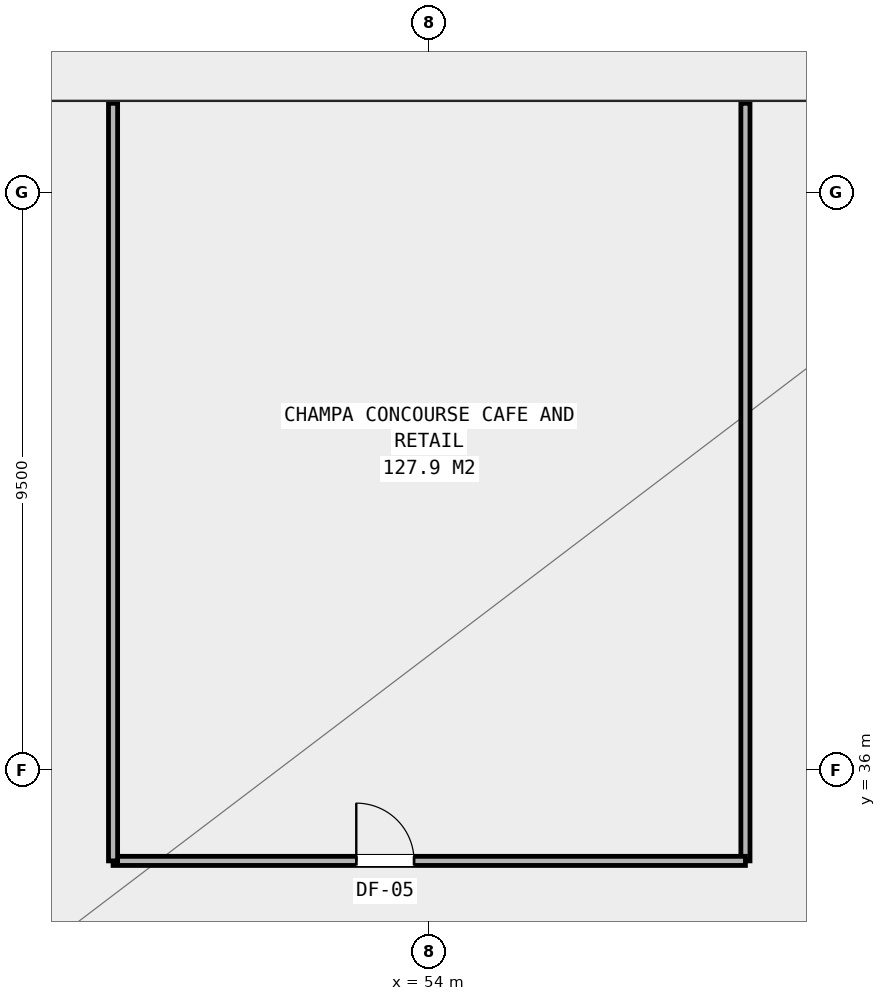
"""IFC4 building model, lengths in metres.
Left out: names, types, materials, properties, quantities, classifications, styles, units other than length and angle.
Written with IfcOpenShell. Run it as: python <this file> out.ifc"""

import sys

from ifc_helpers import new_model, si_unit, direction, frame, frame_2d, origin, place, context, subcontext, project, spatial, rectangle, extrude, element, fill, save


model = new_model("IFC4")
c1 = context("Model", 3, precision=1e-05, world=origin(), true_north=direction((0.0, 1.0)))
c2 = subcontext(c1, "Body", "Model", "MODEL_VIEW")
j1 = project(units=[si_unit("LENGTHUNIT", "METRE"), si_unit("PLANEANGLEUNIT", "RADIAN")], contexts=[c1])
p1 = place(None, origin())
s1 = spatial("IfcSite", under=j1, at=p1, CompositionType="ELEMENT")
p2 = place(p1, origin())
s2 = spatial("IfcBuilding", under=s1, at=p2, CompositionType="ELEMENT")
p3 = place(p2, origin())
s3 = spatial("IfcBuildingStorey", under=s2, at=p3, CompositionType="ELEMENT", Elevation=0.0)
p4 = place(p3, frame((59.2, 34.5, 0.0), z_axis=(0.0, 0.0, 1.0), x_axis=(0.0, 1.0, 0.0)))
e1 = element("IfcWall", 1, at=p4, inside=s3, PredefinedType="PARTITIONING", context=c2, shape_type="SweptSolid", body=[
    extrude(rectangle(XDim=12.46, YDim=0.15, at=frame_2d((6.23, 0.0))), origin(), (0.0, 0.0, 1.0), 4.431),
])
p5 = place(p3, frame((48.8, 34.5, 0.0), z_axis=(0.0, 0.0, 1.0), x_axis=(1.0, 0.0, 0.0)))
e2 = element("IfcWall", 2, at=p5, inside=s3, PredefinedType="PARTITIONING", context=c2, shape_type="SweptSolid", body=[
    extrude(rectangle(XDim=10.4, YDim=0.15, at=frame_2d((5.2, 0.0))), origin(), (0.0, 0.0, 1.0), 4.431),
])
p6 = place(p5, frame((4.0, 0.0, 0.0)))
e3 = element("IfcOpeningElement", 3, at=p6, cuts=e2, PredefinedType="OPENING", context=c2, shape_type="SweptSolid", body=[
    extrude(rectangle(XDim=0.95, YDim=2.1, at=frame_2d((0.475, 1.05))), frame((0.0, 0.085, 0.0), z_axis=(0.0, -1.0, 0.0), x_axis=(1.0, 0.0, 0.0)), (0.0, 0.0, 1.0), 0.17),
])
p7 = place(p3, frame((48.8, 34.5, 0.0), z_axis=(0.0, 0.0, 1.0), x_axis=(0.0, 1.0, 0.0)))
e4 = element("IfcWall", 4, at=p7, inside=s3, PredefinedType="PARTITIONING", context=c2, shape_type="SweptSolid", body=[
    extrude(rectangle(XDim=12.46, YDim=0.15, at=frame_2d((6.23, 0.0))), origin(), (0.0, 0.0, 1.0), 4.431),
])
p8 = place(p6, origin())
e5 = element("IfcDoor", 5, at=p8, inside=s3, OperationType="SINGLE_SWING_LEFT", PredefinedType="DOOR", context=c2, shape_type="SweptSolid", body=[
    extrude(rectangle(XDim=0.95, YDim=2.1, at=frame_2d((0.475, 1.05))), frame((0.0, 0.025, 0.0), z_axis=(0.0, -1.0, 0.0), x_axis=(1.0, 0.0, 0.0)), (0.0, 0.0, 1.0), 0.05),
])
fill(e3, e5)
save(model, sys.argv[1])
